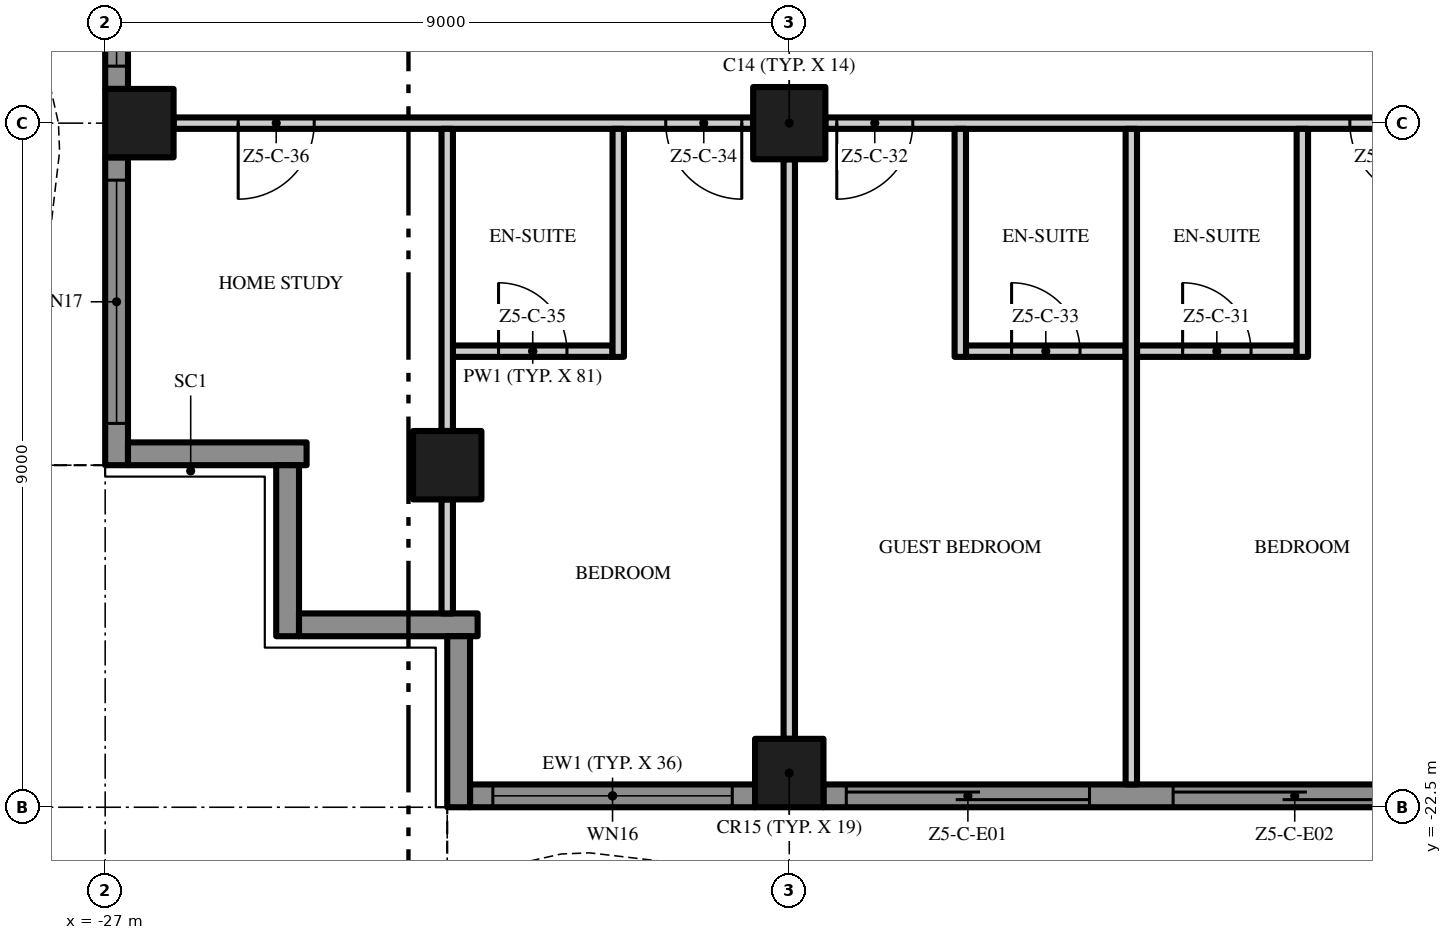
"""IFC4 building model, lengths in metres.
Left out: names, types, materials, properties, quantities, classifications, styles, units other than length and angle.
Written with IfcOpenShell. Run it as: python <this file> out.ifc"""

import sys

from ifc_helpers import new_model, si_unit, direction, frame, frame_2d, origin, origin_2d, place, context, subcontext, project, spatial, polyline, rectangle, outline, extrude, element, fill, save


model = new_model("IFC4")
c1 = context("Model", 3, precision=1e-05, world=origin(), true_north=direction((0.0, 1.0)))
c2 = subcontext(c1, "Body", "Model", "MODEL_VIEW")
j1 = project(units=[si_unit("LENGTHUNIT", "METRE"), si_unit("PLANEANGLEUNIT", "RADIAN")], contexts=[c1])
p1 = place(None, origin())
s1 = spatial("IfcSite", under=j1, at=p1, CompositionType="ELEMENT")
p2 = place(p1, origin())
s2 = spatial("IfcBuilding", under=s1, at=p2, CompositionType="ELEMENT")
p3 = place(p2, frame((0.0, 0.0, 261.6)))
s3 = spatial("IfcBuildingStorey", under=s2, at=p3, CompositionType="ELEMENT", Elevation=261.6)
p4 = place(p3, frame((-18.0, -13.5, 0.0), z_axis=(0.0, 0.0, 1.0), x_axis=(1.0, 0.0, 0.0)))
e1 = element("IfcColumn", 1, at=p4, inside=s3, PredefinedType="COLUMN", context=c2, shape_type="SweptSolid", body=[
    extrude(rectangle(XDim=0.95, YDim=0.95, at=origin_2d()), origin(), (0.0, 0.0, 1.0), 3.5),
])
for number, where, z_axis, x_axis in (
    (2, (-18.0, -22.05, 0.0), (0.0, 0.0, 1.0), (1.0, 0.0, 0.0)),
    (3, (-26.55, -13.5, 0.0), (0.0, 0.0, 1.0), (1.0, 0.0, 0.0)),
    (4, (-22.5, -18.0, 0.0), (0.0, 0.0, 1.0), (1.0, 0.0, 0.0)),
):
    element("IfcColumn", number, at=place(p3, frame(where, z_axis=z_axis, x_axis=x_axis)), inside=s3, PredefinedType="COLUMN", context=c2, shape_type="SweptSolid", body=[
        extrude(rectangle(XDim=0.9, YDim=0.9, at=origin_2d()), origin(), (0.0, 0.0, 1.0), 3.5),
    ])
p5 = place(p3, frame((-18.45, -22.35, 0.0), z_axis=(0.0, 0.0, 1.0), x_axis=(-1.0, 0.0, 0.0)))
e5 = element("IfcWall", 5, at=p5, inside=s3, PredefinedType="SOLIDWALL", context=c2, shape_type="SweptSolid", body=[
    extrude(rectangle(XDim=3.75, YDim=0.3, at=frame_2d((1.875, 0.0))), origin(), (0.0, 0.0, 1.0), 3.5),
])
p6 = place(p5, frame((0.3, 0.0, 0.45)))
e6 = element("IfcOpeningElement", 6, at=p6, cuts=e5, PredefinedType="OPENING", context=c2, shape_type="SweptSolid", body=[
    extrude(rectangle(XDim=3.15, YDim=2.65, at=frame_2d((1.575, 1.325))), frame((0.0, 0.16, 0.0), z_axis=(0.0, -1.0, 0.0), x_axis=(1.0, 0.0, 0.0)), (0.0, 0.0, 1.0), 0.32),
])
p7 = place(p3, frame((-9.45, -22.35, 0.0), z_axis=(0.0, 0.0, 1.0), x_axis=(-1.0, 0.0, 0.0)))
e7 = element("IfcWall", 7, at=p7, inside=s3, PredefinedType="SOLIDWALL", context=c2, shape_type="SweptSolid", body=[
    extrude(rectangle(XDim=8.1, YDim=0.3, at=frame_2d((4.05, 0.0))), origin(), (0.0, 0.0, 1.0), 3.5),
])
p8 = place(p7, frame((4.6, 0.0, 0.0)))
e8 = element("IfcOpeningElement", 8, at=p8, cuts=e7, PredefinedType="OPENING", context=c2, shape_type="SweptSolid", body=[
    extrude(rectangle(XDim=3.2, YDim=2.4, at=frame_2d((1.6, 1.2))), frame((0.0, 0.16, 0.0), z_axis=(0.0, -1.0, 0.0), x_axis=(1.0, 0.0, 0.0)), (0.0, 0.0, 1.0), 0.32),
])
p9 = place(p7, frame((0.3, 0.0, 0.0)))
e9 = element("IfcOpeningElement", 9, at=p9, cuts=e7, PredefinedType="OPENING", context=c2, shape_type="SweptSolid", body=[
    extrude(rectangle(XDim=3.2, YDim=2.4, at=frame_2d((1.6, 1.2))), frame((0.0, 0.16, 0.0), z_axis=(0.0, -1.0, 0.0), x_axis=(1.0, 0.0, 0.0)), (0.0, 0.0, 1.0), 0.32),
])
p10 = place(p3, frame((-26.85, -13.05, 0.0), z_axis=(0.0, 0.0, 1.0), x_axis=(0.0, 1.0, 0.0)))
e10 = element("IfcWall", 10, at=p10, inside=s3, PredefinedType="SOLIDWALL", context=c2, shape_type="SweptSolid", body=[
    extrude(rectangle(XDim=8.1, YDim=0.3, at=frame_2d((4.05, 0.0))), origin(), (0.0, 0.0, 1.0), 3.5),
])
p11 = place(p10, frame((4.6, 0.0, 0.0)))
e11 = element("IfcOpeningElement", 11, at=p11, cuts=e10, PredefinedType="OPENING", context=c2, shape_type="SweptSolid", body=[
    extrude(rectangle(XDim=3.2, YDim=2.4, at=frame_2d((1.6, 1.2))), frame((0.0, 0.16, 0.0), z_axis=(0.0, -1.0, 0.0), x_axis=(1.0, 0.0, 0.0)), (0.0, 0.0, 1.0), 0.32),
])
p12 = place(p10, frame((0.3, 0.0, 0.45)))
e12 = element("IfcOpeningElement", 12, at=p12, cuts=e10, PredefinedType="OPENING", context=c2, shape_type="SweptSolid", body=[
    extrude(rectangle(XDim=3.2, YDim=2.65, at=frame_2d((1.6, 1.325))), frame((0.0, 0.16, 0.0), z_axis=(0.0, -1.0, 0.0), x_axis=(1.0, 0.0, 0.0)), (0.0, 0.0, 1.0), 0.32),
])
p13 = place(p3, frame((-26.85, -18.0, 0.0), z_axis=(0.0, 0.0, 1.0), x_axis=(0.0, 1.0, 0.0)))
e13 = element("IfcWall", 13, at=p13, inside=s3, PredefinedType="SOLIDWALL", context=c2, shape_type="SweptSolid", body=[
    extrude(rectangle(XDim=4.05, YDim=0.3, at=frame_2d((2.025, 0.0))), origin(), (0.0, 0.0, 1.0), 3.5),
])
p14 = place(p13, frame((0.55, 0.0, 0.45)))
e14 = element("IfcOpeningElement", 14, at=p14, cuts=e13, PredefinedType="OPENING", context=c2, shape_type="SweptSolid", body=[
    extrude(rectangle(XDim=3.2, YDim=2.65, at=frame_2d((1.6, 1.325))), frame((0.0, 0.16, 0.0), z_axis=(0.0, -1.0, 0.0), x_axis=(1.0, 0.0, 0.0)), (0.0, 0.0, 1.0), 0.32),
])
p15 = place(p3, frame((-24.35, -17.85, 0.0), z_axis=(0.0, 0.0, 1.0), x_axis=(-1.0, 0.0, 0.0)))
e15 = element("IfcWall", 15, at=p15, inside=s3, PredefinedType="SOLIDWALL", context=c2, shape_type="SweptSolid", body=[
    extrude(rectangle(XDim=2.35, YDim=0.3, at=frame_2d((1.175, 0.0))), origin(), (0.0, 0.0, 1.0), 3.5),
])
p16 = place(p3, frame((-24.6, -20.25, 0.0), z_axis=(0.0, 0.0, 1.0), x_axis=(0.0, 1.0, 0.0)))
e16 = element("IfcWall", 16, at=p16, inside=s3, PredefinedType="SOLIDWALL", context=c2, shape_type="SweptSolid", body=[
    extrude(rectangle(XDim=2.25, YDim=0.3, at=frame_2d((1.125, 0.0))), origin(), (0.0, 0.0, 1.0), 3.5),
])
p17 = place(p3, frame((-22.1, -20.1, 0.0), z_axis=(0.0, 0.0, 1.0), x_axis=(-1.0, 0.0, 0.0)))
e17 = element("IfcWall", 17, at=p17, inside=s3, PredefinedType="SOLIDWALL", context=c2, shape_type="SweptSolid", body=[
    extrude(rectangle(XDim=2.35, YDim=0.3, at=frame_2d((1.175, 0.0))), origin(), (0.0, 0.0, 1.0), 3.5),
])
p18 = place(p3, frame((-22.35, -22.5, 0.0), z_axis=(0.0, 0.0, 1.0), x_axis=(0.0, 1.0, 0.0)))
e18 = element("IfcWall", 18, at=p18, inside=s3, PredefinedType="SOLIDWALL", context=c2, shape_type="SweptSolid", body=[
    extrude(rectangle(XDim=2.25, YDim=0.3, at=frame_2d((1.125, 0.0))), origin(), (0.0, 0.0, 1.0), 3.5),
])
p19 = place(p3, origin())
e19 = element("IfcWall", 19, at=p19, inside=s3, PredefinedType="USERDEFINED", context=c2, shape_type="SweptSolid", body=[
    extrude(outline(polyline([(-22.5, -23.451), (-21.0, -23.115), (-20.625, -23.1), (-19.5, -23.231), (-18.0, -23.755), (-16.5, -24.488), (-15.0, -25.149), (-13.5, -25.485), (-13.125, -25.5), (-12.0, -25.369), (-10.5, -24.845), (-9.0, -24.112), (-7.5, -23.451), (-6.0, -23.115), (-5.625, -23.1), (-4.5, -23.231), (-3.0, -23.755), (-1.5, -24.488), (0.0, -25.149), (1.5, -25.485), (1.875, -25.5), (3.0, -25.369), (4.5, -24.845), (6.0, -24.112), (7.5, -23.451), (9.0, -23.115), (9.375, -23.1), (10.5, -23.231), (12.0, -23.755), (13.5, -24.488), (15.0, -25.149), (16.5, -25.485), (16.875, -25.5), (18.0, -25.369), (19.5, -24.845), (21.0, -24.112), (22.5, -23.451), (22.399, -23.223), (20.895, -23.885), (19.404, -24.614), (17.944, -25.124), (16.865, -25.249), (16.533, -25.236), (15.079, -24.91), (13.605, -24.261), (12.096, -23.524), (10.556, -22.986), (9.385, -22.849), (8.967, -22.866), (7.421, -23.213), (5.895, -23.885), (4.404, -24.614), (2.944, -25.124), (1.865, -25.249), (1.533, -25.236), (0.079, -24.91), (-1.395, -24.261), (-2.904, -23.524), (-4.444, -22.986), (-5.615, -22.849), (-6.033, -22.866), (-7.579, -23.213), (-9.105, -23.885), (-10.596, -24.614), (-12.056, -25.124), (-13.135, -25.249), (-13.467, -25.236), (-14.921, -24.91), (-16.395, -24.261), (-17.904, -23.524), (-19.444, -22.986), (-20.615, -22.849), (-21.033, -22.866), (-22.555, -23.208), (-22.5, -23.451)])), origin(), (0.0, 0.0, 1.0), 0.9),
])
p20 = place(p3, origin())
e20 = element("IfcWall", 20, at=p20, inside=s3, PredefinedType="USERDEFINED", context=c2, shape_type="SweptSolid", body=[
    extrude(outline(polyline([(-27.951, 18.0), (-27.615, 16.5), (-27.6, 16.125), (-27.731, 15.0), (-28.255, 13.5), (-28.988, 12.0), (-29.649, 10.5), (-29.985, 9.0), (-30.0, 8.625), (-29.869, 7.5), (-29.345, 6.0), (-28.612, 4.5), (-27.951, 3.0), (-27.615, 1.5), (-27.6, 1.125), (-27.731, 0.0), (-28.255, -1.5), (-28.988, -3.0), (-29.649, -4.5), (-29.985, -6.0), (-30.0, -6.375), (-29.869, -7.5), (-29.345, -9.0), (-28.612, -10.5), (-27.951, -12.0), (-27.615, -13.5), (-27.6, -13.875), (-27.731, -15.0), (-28.255, -16.5), (-28.988, -18.0), (-28.763, -18.11), (-28.024, -16.596), (-27.486, -15.056), (-27.349, -13.885), (-27.366, -13.467), (-27.713, -11.921), (-28.385, -10.395), (-29.114, -8.904), (-29.624, -7.444), (-29.749, -6.365), (-29.736, -6.033), (-29.41, -4.579), (-28.761, -3.105), (-28.024, -1.596), (-27.486, -0.056), (-27.349, 1.115), (-27.366, 1.533), (-27.713, 3.079), (-28.385, 4.605), (-29.114, 6.096), (-29.624, 7.556), (-29.749, 8.635), (-29.736, 8.967), (-29.41, 10.421), (-28.761, 11.895), (-28.024, 13.404), (-27.486, 14.944), (-27.349, 16.115), (-27.366, 16.533), (-27.708, 18.055), (-27.951, 18.0)])), origin(), (0.0, 0.0, 1.0), 0.9),
])
p21 = place(p3, frame((-22.425, -16.5, 0.0), z_axis=(0.0, 0.0, 1.0), x_axis=(1.0, 0.0, 0.0)))
e21 = element("IfcWall", 21, at=p21, inside=s3, PredefinedType="PARTITIONING", context=c2, shape_type="SweptSolid", body=[
    extrude(rectangle(XDim=2.1, YDim=0.15, at=frame_2d((1.05, 0.0))), origin(), (0.0, 0.0, 1.0), 3.5),
])
p22 = place(p21, frame((0.6, 0.0, 0.0)))
e22 = element("IfcOpeningElement", 22, at=p22, cuts=e21, PredefinedType="OPENING", context=c2, shape_type="SweptSolid", body=[
    extrude(rectangle(XDim=0.9, YDim=2.1, at=frame_2d((0.45, 1.05))), frame((0.0, 0.085, 0.0), z_axis=(0.0, -1.0, 0.0), x_axis=(1.0, 0.0, 0.0)), (0.0, 0.0, 1.0), 0.17),
])
p23 = place(p3, frame((-15.675, -16.5, 0.0), z_axis=(0.0, 0.0, 1.0), x_axis=(1.0, 0.0, 0.0)))
e23 = element("IfcWall", 23, at=p23, inside=s3, PredefinedType="PARTITIONING", context=c2, shape_type="SweptSolid", body=[
    extrude(rectangle(XDim=2.1, YDim=0.15, at=frame_2d((1.05, 0.0))), origin(), (0.0, 0.0, 1.0), 3.5),
])
p24 = place(p23, frame((0.6, 0.0, 0.0)))
e24 = element("IfcOpeningElement", 24, at=p24, cuts=e23, PredefinedType="OPENING", context=c2, shape_type="SweptSolid", body=[
    extrude(rectangle(XDim=0.9, YDim=2.1, at=frame_2d((0.45, 1.05))), frame((0.0, 0.085, 0.0), z_axis=(0.0, -1.0, 0.0), x_axis=(1.0, 0.0, 0.0)), (0.0, 0.0, 1.0), 0.17),
])
p25 = place(p3, frame((-13.425, -16.5, 0.0), z_axis=(0.0, 0.0, 1.0), x_axis=(1.0, 0.0, 0.0)))
e25 = element("IfcWall", 25, at=p25, inside=s3, PredefinedType="PARTITIONING", context=c2, shape_type="SweptSolid", body=[
    extrude(rectangle(XDim=2.1, YDim=0.15, at=frame_2d((1.05, 0.0))), origin(), (0.0, 0.0, 1.0), 3.5),
])
p26 = place(p25, frame((0.6, 0.0, 0.0)))
e26 = element("IfcOpeningElement", 26, at=p26, cuts=e25, PredefinedType="OPENING", context=c2, shape_type="SweptSolid", body=[
    extrude(rectangle(XDim=0.9, YDim=2.1, at=frame_2d((0.45, 1.05))), frame((0.0, 0.085, 0.0), z_axis=(0.0, -1.0, 0.0), x_axis=(1.0, 0.0, 0.0)), (0.0, 0.0, 1.0), 0.17),
])
p27 = place(p3, frame((-18.475, -13.5, 0.0), z_axis=(0.0, 0.0, 1.0), x_axis=(-1.0, 0.0, 0.0)))
e27 = element("IfcWall", 27, at=p27, inside=s3, PredefinedType="PARTITIONING", context=c2, shape_type="SweptSolid", body=[
    extrude(rectangle(XDim=7.625, YDim=0.15, at=frame_2d((3.812, 0.0))), origin(), (0.0, 0.0, 1.0), 3.5),
])
p28 = place(p27, frame((0.15, 0.0, 0.0)))
e28 = element("IfcOpeningElement", 28, at=p28, cuts=e27, PredefinedType="OPENING", context=c2, shape_type="SweptSolid", body=[
    extrude(rectangle(XDim=1.0, YDim=2.4, at=frame_2d((0.5, 1.2))), frame((0.0, 0.085, 0.0), z_axis=(0.0, -1.0, 0.0), x_axis=(1.0, 0.0, 0.0)), (0.0, 0.0, 1.0), 0.17),
])
p29 = place(p27, frame((5.775, 0.0, 0.0)))
e29 = element("IfcOpeningElement", 29, at=p29, cuts=e27, PredefinedType="OPENING", context=c2, shape_type="SweptSolid", body=[
    extrude(rectangle(XDim=1.0, YDim=2.4, at=frame_2d((0.5, 1.2))), frame((0.0, 0.085, 0.0), z_axis=(0.0, -1.0, 0.0), x_axis=(1.0, 0.0, 0.0)), (0.0, 0.0, 1.0), 0.17),
])
p30 = place(p3, frame((-9.475, -13.5, 0.0), z_axis=(0.0, 0.0, 1.0), x_axis=(-1.0, 0.0, 0.0)))
e30 = element("IfcWall", 30, at=p30, inside=s3, PredefinedType="PARTITIONING", context=c2, shape_type="SweptSolid", body=[
    extrude(rectangle(XDim=8.05, YDim=0.15, at=frame_2d((4.025, 0.0))), origin(), (0.0, 0.0, 1.0), 3.5),
])
p31 = place(p30, frame((0.15, 0.0, 0.0)))
e31 = element("IfcOpeningElement", 31, at=p31, cuts=e30, PredefinedType="OPENING", context=c2, shape_type="SweptSolid", body=[
    extrude(rectangle(XDim=1.0, YDim=2.4, at=frame_2d((0.5, 1.2))), frame((0.0, 0.085, 0.0), z_axis=(0.0, -1.0, 0.0), x_axis=(1.0, 0.0, 0.0)), (0.0, 0.0, 1.0), 0.17),
])
p32 = place(p30, frame((6.9, 0.0, 0.0)))
e32 = element("IfcOpeningElement", 32, at=p32, cuts=e30, PredefinedType="OPENING", context=c2, shape_type="SweptSolid", body=[
    extrude(rectangle(XDim=1.0, YDim=2.4, at=frame_2d((0.5, 1.2))), frame((0.0, 0.085, 0.0), z_axis=(0.0, -1.0, 0.0), x_axis=(1.0, 0.0, 0.0)), (0.0, 0.0, 1.0), 0.17),
])
p33 = place(p3, frame((-22.5, -19.95, 0.0), z_axis=(0.0, 0.0, 1.0), x_axis=(0.0, 1.0, 0.0)))
e33 = element("IfcWall", 33, at=p33, inside=s3, PredefinedType="PARTITIONING", context=c2, shape_type="SweptSolid", body=[
    extrude(rectangle(XDim=1.5, YDim=0.15, at=frame_2d((0.75, 0.0))), origin(), (0.0, 0.0, 1.0), 3.5),
])
p34 = place(p3, frame((-22.5, -17.55, 0.0), z_axis=(0.0, 0.0, 1.0), x_axis=(0.0, 1.0, 0.0)))
e34 = element("IfcWall", 34, at=p34, inside=s3, PredefinedType="PARTITIONING", context=c2, shape_type="SweptSolid", body=[
    extrude(rectangle(XDim=3.975, YDim=0.15, at=frame_2d((1.988, 0.0))), origin(), (0.0, 0.0, 1.0), 3.5),
])
p35 = place(p3, frame((-20.25, -16.575, 0.0), z_axis=(0.0, 0.0, 1.0), x_axis=(0.0, 1.0, 0.0)))
e35 = element("IfcWall", 35, at=p35, inside=s3, PredefinedType="PARTITIONING", context=c2, shape_type="SweptSolid", body=[
    extrude(rectangle(XDim=3.0, YDim=0.15, at=frame_2d((1.5, 0.0))), origin(), (0.0, 0.0, 1.0), 3.5),
])
p36 = place(p3, frame((-18.0, -21.6, 0.0), z_axis=(0.0, 0.0, 1.0), x_axis=(0.0, 1.0, 0.0)))
e36 = element("IfcWall", 36, at=p36, inside=s3, PredefinedType="PARTITIONING", context=c2, shape_type="SweptSolid", body=[
    extrude(rectangle(XDim=7.625, YDim=0.15, at=frame_2d((3.812, 0.0))), origin(), (0.0, 0.0, 1.0), 3.5),
])
p37 = place(p3, frame((-15.75, -16.575, 0.0), z_axis=(0.0, 0.0, 1.0), x_axis=(0.0, 1.0, 0.0)))
e37 = element("IfcWall", 37, at=p37, inside=s3, PredefinedType="PARTITIONING", context=c2, shape_type="SweptSolid", body=[
    extrude(rectangle(XDim=3.0, YDim=0.15, at=frame_2d((1.5, 0.0))), origin(), (0.0, 0.0, 1.0), 3.5),
])
p38 = place(p3, frame((-13.5, -22.2, 0.0), z_axis=(0.0, 0.0, 1.0), x_axis=(0.0, 1.0, 0.0)))
e38 = element("IfcWall", 38, at=p38, inside=s3, PredefinedType="PARTITIONING", context=c2, shape_type="SweptSolid", body=[
    extrude(rectangle(XDim=8.625, YDim=0.15, at=frame_2d((4.312, 0.0))), origin(), (0.0, 0.0, 1.0), 3.5),
])
p39 = place(p3, frame((-11.25, -16.575, 0.0), z_axis=(0.0, 0.0, 1.0), x_axis=(0.0, 1.0, 0.0)))
e39 = element("IfcWall", 39, at=p39, inside=s3, PredefinedType="PARTITIONING", context=c2, shape_type="SweptSolid", body=[
    extrude(rectangle(XDim=3.0, YDim=0.15, at=frame_2d((1.5, 0.0))), origin(), (0.0, 0.0, 1.0), 3.5),
])
p40 = place(p6, origin())
e40 = element("IfcWindow", 40, at=p40, inside=s3, PartitioningType="SINGLE_PANEL", PredefinedType="WINDOW", context=c2, shape_type="SweptSolid", body=[
    extrude(rectangle(XDim=3.15, YDim=2.65, at=frame_2d((1.575, 1.325))), frame((0.0, 0.03, 0.0), z_axis=(0.0, -1.0, 0.0), x_axis=(1.0, 0.0, 0.0)), (0.0, 0.0, 1.0), 0.06),
])
fill(e6, e40)
p41 = place(p8, origin())
e41 = element("IfcDoor", 41, at=p41, inside=s3, OperationType="SINGLE_SWING_LEFT", PredefinedType="DOOR", context=c2, shape_type="SweptSolid", body=[
    extrude(rectangle(XDim=3.2, YDim=2.4, at=frame_2d((1.6, 1.2))), frame((0.0, 0.025, 0.0), z_axis=(0.0, -1.0, 0.0), x_axis=(1.0, 0.0, 0.0)), (0.0, 0.0, 1.0), 0.05),
])
fill(e8, e41)
p42 = place(p9, origin())
e42 = element("IfcDoor", 42, at=p42, inside=s3, OperationType="SINGLE_SWING_LEFT", PredefinedType="DOOR", context=c2, shape_type="SweptSolid", body=[
    extrude(rectangle(XDim=3.2, YDim=2.4, at=frame_2d((1.6, 1.2))), frame((0.0, 0.025, 0.0), z_axis=(0.0, -1.0, 0.0), x_axis=(1.0, 0.0, 0.0)), (0.0, 0.0, 1.0), 0.05),
])
fill(e9, e42)
p43 = place(p12, origin())
e43 = element("IfcWindow", 43, at=p43, inside=s3, PartitioningType="SINGLE_PANEL", PredefinedType="WINDOW", context=c2, shape_type="SweptSolid", body=[
    extrude(rectangle(XDim=3.2, YDim=2.65, at=frame_2d((1.6, 1.325))), frame((0.0, 0.03, 0.0), z_axis=(0.0, -1.0, 0.0), x_axis=(1.0, 0.0, 0.0)), (0.0, 0.0, 1.0), 0.06),
])
fill(e12, e43)
p44 = place(p14, origin())
e44 = element("IfcWindow", 44, at=p44, inside=s3, PartitioningType="SINGLE_PANEL", PredefinedType="WINDOW", context=c2, shape_type="SweptSolid", body=[
    extrude(rectangle(XDim=3.2, YDim=2.65, at=frame_2d((1.6, 1.325))), frame((0.0, 0.03, 0.0), z_axis=(0.0, -1.0, 0.0), x_axis=(1.0, 0.0, 0.0)), (0.0, 0.0, 1.0), 0.06),
])
fill(e14, e44)
p45 = place(p31, origin())
e45 = element("IfcDoor", 45, at=p45, inside=s3, OperationType="SINGLE_SWING_LEFT", PredefinedType="DOOR", context=c2, shape_type="SweptSolid", body=[
    extrude(rectangle(XDim=1.0, YDim=2.4, at=frame_2d((0.5, 1.2))), frame((0.0, 0.025, 0.0), z_axis=(0.0, -1.0, 0.0), x_axis=(1.0, 0.0, 0.0)), (0.0, 0.0, 1.0), 0.05),
])
fill(e31, e45)
p46 = place(p26, origin())
e46 = element("IfcDoor", 46, at=p46, inside=s3, OperationType="SINGLE_SWING_LEFT", PredefinedType="DOOR", context=c2, shape_type="SweptSolid", body=[
    extrude(rectangle(XDim=0.9, YDim=2.1, at=frame_2d((0.45, 1.05))), frame((0.0, 0.025, 0.0), z_axis=(0.0, -1.0, 0.0), x_axis=(1.0, 0.0, 0.0)), (0.0, 0.0, 1.0), 0.05),
])
fill(e26, e46)
p47 = place(p32, origin())
e47 = element("IfcDoor", 47, at=p47, inside=s3, OperationType="SINGLE_SWING_RIGHT", PredefinedType="DOOR", context=c2, shape_type="SweptSolid", body=[
    extrude(rectangle(XDim=1.0, YDim=2.4, at=frame_2d((0.5, 1.2))), frame((0.0, 0.025, 0.0), z_axis=(0.0, -1.0, 0.0), x_axis=(1.0, 0.0, 0.0)), (0.0, 0.0, 1.0), 0.05),
])
fill(e32, e47)
p48 = place(p24, origin())
e48 = element("IfcDoor", 48, at=p48, inside=s3, OperationType="SINGLE_SWING_LEFT", PredefinedType="DOOR", context=c2, shape_type="SweptSolid", body=[
    extrude(rectangle(XDim=0.9, YDim=2.1, at=frame_2d((0.45, 1.05))), frame((0.0, 0.025, 0.0), z_axis=(0.0, -1.0, 0.0), x_axis=(1.0, 0.0, 0.0)), (0.0, 0.0, 1.0), 0.05),
])
fill(e24, e48)
p49 = place(p28, origin())
e49 = element("IfcDoor", 49, at=p49, inside=s3, OperationType="SINGLE_SWING_LEFT", PredefinedType="DOOR", context=c2, shape_type="SweptSolid", body=[
    extrude(rectangle(XDim=1.0, YDim=2.4, at=frame_2d((0.5, 1.2))), frame((0.0, 0.025, 0.0), z_axis=(0.0, -1.0, 0.0), x_axis=(1.0, 0.0, 0.0)), (0.0, 0.0, 1.0), 0.05),
])
fill(e28, e49)
p50 = place(p22, origin())
e50 = element("IfcDoor", 50, at=p50, inside=s3, OperationType="SINGLE_SWING_LEFT", PredefinedType="DOOR", context=c2, shape_type="SweptSolid", body=[
    extrude(rectangle(XDim=0.9, YDim=2.1, at=frame_2d((0.45, 1.05))), frame((0.0, 0.025, 0.0), z_axis=(0.0, -1.0, 0.0), x_axis=(1.0, 0.0, 0.0)), (0.0, 0.0, 1.0), 0.05),
])
fill(e22, e50)
p51 = place(p29, origin())
e51 = element("IfcDoor", 51, at=p51, inside=s3, OperationType="SINGLE_SWING_RIGHT", PredefinedType="DOOR", context=c2, shape_type="SweptSolid", body=[
    extrude(rectangle(XDim=1.0, YDim=2.4, at=frame_2d((0.5, 1.2))), frame((0.0, 0.025, 0.0), z_axis=(0.0, -1.0, 0.0), x_axis=(1.0, 0.0, 0.0)), (0.0, 0.0, 1.0), 0.05),
])
fill(e29, e51)
save(model, sys.argv[1])
